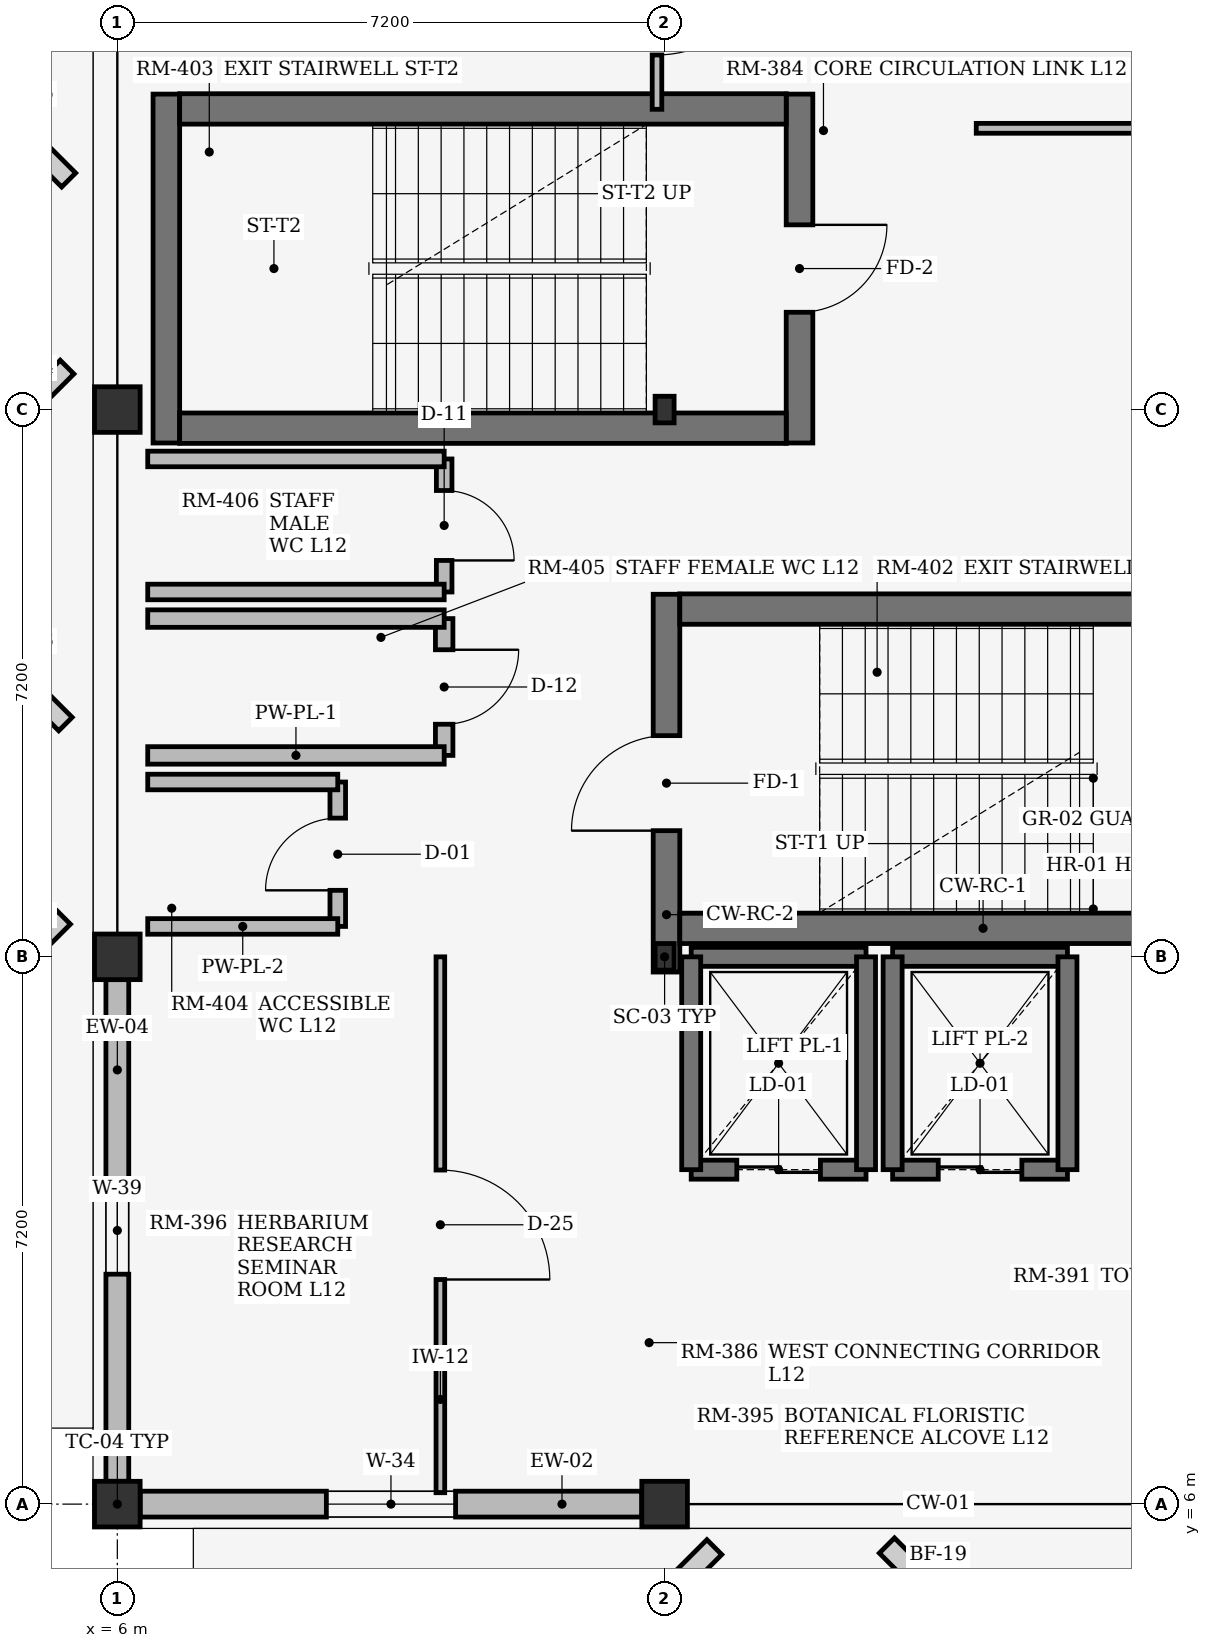
"""IFC4 building model, lengths in metres.
Left out: names, types, materials, properties, quantities, classifications, styles, units other than length and angle.
Written with IfcOpenShell. Run it as: python <this file> out.ifc"""

import sys

from ifc_helpers import new_model, si_unit, direction, frame, frame_2d, origin, origin_2d, place, context, subcontext, project, spatial, rectangle, i_section, extrude, element, fill, save


model = new_model("IFC4")
c1 = context("Model", 3, precision=1e-05, world=origin(), true_north=direction((0.0, 1.0)))
c2 = subcontext(c1, "Body", "Model", "MODEL_VIEW")
j1 = project(units=[si_unit("LENGTHUNIT", "METRE"), si_unit("PLANEANGLEUNIT", "RADIAN")], contexts=[c1])
p1 = place(None, origin())
s1 = spatial("IfcSite", under=j1, at=p1, CompositionType="ELEMENT")
p2 = place(p1, origin())
s2 = spatial("IfcBuilding", under=s1, at=p2, CompositionType="ELEMENT")
p3 = place(p2, frame((0.0, 0.0, 48.3)))
s3 = spatial("IfcBuildingStorey", under=s2, at=p3, CompositionType="ELEMENT", Elevation=48.3)
for number, where, z_axis, x_axis in (
    (1, (6.0, 6.0, 0.0), (0.0, 0.0, 1.0), (1.0, 0.0, 0.0)),
    (2, (6.0, 13.2, 0.0), (0.0, 0.0, 1.0), (1.0, 0.0, 0.0)),
    (3, (6.0, 20.4, 0.0), (0.0, 0.0, 1.0), (1.0, 0.0, 0.0)),
    (4, (13.2, 6.0, 0.0), (0.0, 0.0, 1.0), (1.0, 0.0, 0.0)),
):
    element("IfcColumn", number, at=place(p3, frame(where, z_axis=z_axis, x_axis=x_axis)), inside=s3, PredefinedType="COLUMN", context=c2, shape_type="SweptSolid", body=[
        extrude(rectangle(XDim=0.6, YDim=0.6, at=origin_2d()), origin(), (0.0, 0.0, 1.0), 3.68),
    ])
for number, where, z_axis, x_axis in (
    (5, (13.2, 13.2, 0.0), (0.0, 0.0, 1.0), (1.0, 0.0, 0.0)),
    (6, (13.2, 20.4, 0.0), (0.0, 0.0, 1.0), (1.0, 0.0, 0.0)),
):
    element("IfcColumn", number, at=place(p3, frame(where, z_axis=z_axis, x_axis=x_axis)), inside=s3, PredefinedType="COLUMN", context=c2, shape_type="SweptSolid", body=[
        extrude(i_section(OverallWidth=0.25, OverallDepth=0.35, WebThickness=0.01, FlangeThickness=0.012, at=origin_2d()), origin(), (0.0, 0.0, 1.0), 3.68),
    ])
p4 = place(p3, frame((6.3, 6.0, 0.0), z_axis=(0.0, 0.0, 1.0), x_axis=(1.0, 0.0, 0.0)))
e7 = element("IfcWall", 7, at=p4, inside=s3, PredefinedType="STANDARD", context=c2, shape_type="SweptSolid", body=[
    extrude(rectangle(XDim=6.6, YDim=0.34, at=frame_2d((3.3, 0.0))), origin(), (0.0, 0.0, 1.0), 3.26),
])
p5 = place(p4, frame((2.45, 0.0, 0.75)))
e8 = element("IfcOpeningElement", 8, at=p5, cuts=e7, PredefinedType="OPENING", context=c2, shape_type="SweptSolid", body=[
    extrude(rectangle(XDim=1.7, YDim=1.35, at=frame_2d((0.85, 0.675))), frame((0.0, 0.18, 0.0), z_axis=(0.0, -1.0, 0.0), x_axis=(1.0, 0.0, 0.0)), (0.0, 0.0, 1.0), 0.36),
])
p6 = place(p3, frame((6.0, 6.3, 0.0), z_axis=(0.0, 0.0, 1.0), x_axis=(0.0, 1.0, 0.0)))
e9 = element("IfcWall", 9, at=p6, inside=s3, PredefinedType="STANDARD", context=c2, shape_type="SweptSolid", body=[
    extrude(rectangle(XDim=6.6, YDim=0.3, at=frame_2d((3.3, 0.0))), origin(), (0.0, 0.0, 1.0), 3.26),
])
p7 = place(p6, frame((2.725, 0.0, 0.75)))
e10 = element("IfcOpeningElement", 10, at=p7, cuts=e9, PredefinedType="OPENING", context=c2, shape_type="SweptSolid", body=[
    extrude(rectangle(XDim=1.15, YDim=1.5, at=frame_2d((0.575, 0.75))), frame((0.0, 0.16, 0.0), z_axis=(0.0, -1.0, 0.0), x_axis=(1.0, 0.0, 0.0)), (0.0, 0.0, 1.0), 0.32),
])
p8 = place(p3, frame((13.225, 13.0, 0.0), z_axis=(0.0, 0.0, 1.0), x_axis=(0.0, 1.0, 0.0)))
e11 = element("IfcWall", 11, at=p8, inside=s3, PredefinedType="SHEAR", context=c2, shape_type="SweptSolid", body=[
    extrude(rectangle(XDim=4.97, YDim=0.35, at=frame_2d((2.485, 0.0))), origin(), (0.0, 0.0, 1.0), 3.68),
])
p9 = place(p8, frame((1.86, 0.0, 0.0)))
e12 = element("IfcOpeningElement", 12, at=p9, cuts=e11, PredefinedType="OPENING", context=c2, shape_type="SweptSolid", body=[
    extrude(rectangle(XDim=1.25, YDim=2.2, at=frame_2d((0.625, 1.1))), frame((0.0, 0.185, 0.0), z_axis=(0.0, -1.0, 0.0), x_axis=(1.0, 0.0, 0.0)), (0.0, 0.0, 1.0), 0.37),
])
for number, where, z_axis, x_axis in (
    (13, (13.4, 13.575, 0.0), (0.0, 0.0, 1.0), (1.0, 0.0, 0.0)),
    (14, (13.4, 17.775, 0.0), (0.0, 0.0, 1.0), (1.0, 0.0, 0.0)),
):
    element("IfcWall", number, at=place(p3, frame(where, z_axis=z_axis, x_axis=x_axis)), inside=s3, PredefinedType="SHEAR", context=c2, shape_type="SweptSolid", body=[
        extrude(rectangle(XDim=7.98, YDim=0.4, at=frame_2d((3.99, 0.0))), origin(), (0.0, 0.0, 1.0), 3.68),
    ])
p10 = place(p3, frame((14.975, 24.55, 0.0), z_axis=(0.0, 0.0, 1.0), x_axis=(0.0, -1.0, 0.0)))
e15 = element("IfcWall", 15, at=p10, inside=s3, PredefinedType="SHEAR", context=c2, shape_type="SweptSolid", body=[
    extrude(rectangle(XDim=4.59, YDim=0.35, at=frame_2d((2.295, 0.0))), origin(), (0.0, 0.0, 1.0), 3.68),
])
p11 = place(p10, frame((1.72, 0.0, 0.0)))
e16 = element("IfcOpeningElement", 16, at=p11, cuts=e15, PredefinedType="OPENING", context=c2, shape_type="SweptSolid", body=[
    extrude(rectangle(XDim=1.15, YDim=2.2, at=frame_2d((0.575, 1.1))), frame((0.0, 0.185, 0.0), z_axis=(0.0, -1.0, 0.0), x_axis=(1.0, 0.0, 0.0)), (0.0, 0.0, 1.0), 0.37),
])
p12 = place(p3, frame((6.645, 24.55, 0.0), z_axis=(0.0, 0.0, 1.0), x_axis=(0.0, -1.0, 0.0)))
e17 = element("IfcWall", 17, at=p12, inside=s3, PredefinedType="SHEAR", context=c2, shape_type="SweptSolid", body=[
    extrude(rectangle(XDim=4.59, YDim=0.35, at=frame_2d((2.295, 0.0))), origin(), (0.0, 0.0, 1.0), 3.68),
])
for number, where, z_axis, x_axis in (
    (18, (14.8, 24.355, 0.0), (0.0, 0.0, 1.0), (-1.0, 0.0, 0.0)),
    (19, (14.8, 20.155, 0.0), (0.0, 0.0, 1.0), (-1.0, 0.0, 0.0)),
):
    element("IfcWall", number, at=place(p3, frame(where, z_axis=z_axis, x_axis=x_axis)), inside=s3, PredefinedType="SHEAR", context=c2, shape_type="SweptSolid", body=[
        extrude(rectangle(XDim=7.98, YDim=0.4, at=frame_2d((3.99, 0.0))), origin(), (0.0, 0.0, 1.0), 3.68),
    ])
p13 = place(p3, frame((13.55, 10.4, 0.0), z_axis=(0.0, 0.0, 1.0), x_axis=(1.0, 0.0, 0.0)))
e20 = element("IfcWall", 20, at=p13, inside=s3, PredefinedType="SHEAR", context=c2, shape_type="SweptSolid", body=[
    extrude(rectangle(XDim=2.3, YDim=0.25, at=frame_2d((1.15, 0.0))), origin(), (0.0, 0.0, 1.0), 3.68),
])
p14 = place(p13, frame((0.6, 0.0, 0.0)))
e21 = element("IfcOpeningElement", 21, at=p14, cuts=e20, PredefinedType="OPENING", context=c2, shape_type="SweptSolid", body=[
    extrude(rectangle(XDim=1.1, YDim=2.2, at=frame_2d((0.55, 1.1))), frame((0.0, 0.135, 0.0), z_axis=(0.0, -1.0, 0.0), x_axis=(1.0, 0.0, 0.0)), (0.0, 0.0, 1.0), 0.27),
])
p15 = place(p3, frame((13.55, 13.2, 0.0), z_axis=(0.0, 0.0, 1.0), x_axis=(1.0, 0.0, 0.0)))
e22 = element("IfcWall", 22, at=p15, inside=s3, PredefinedType="SHEAR", context=c2, shape_type="SweptSolid", body=[
    extrude(rectangle(XDim=2.3, YDim=0.25, at=frame_2d((1.15, 0.0))), origin(), (0.0, 0.0, 1.0), 3.68),
])
for number, where, z_axis, x_axis in (
    (23, (13.55, 10.4, 0.0), (0.0, 0.0, 1.0), (0.0, 1.0, 0.0)),
    (24, (15.85, 10.4, 0.0), (0.0, 0.0, 1.0), (0.0, 1.0, 0.0)),
):
    element("IfcWall", number, at=place(p3, frame(where, z_axis=z_axis, x_axis=x_axis)), inside=s3, PredefinedType="SHEAR", context=c2, shape_type="SweptSolid", body=[
        extrude(rectangle(XDim=2.8, YDim=0.25, at=frame_2d((1.4, 0.0))), origin(), (0.0, 0.0, 1.0), 3.68),
    ])
p16 = place(p3, frame((16.2, 10.4, 0.0), z_axis=(0.0, 0.0, 1.0), x_axis=(1.0, 0.0, 0.0)))
e25 = element("IfcWall", 25, at=p16, inside=s3, PredefinedType="SHEAR", context=c2, shape_type="SweptSolid", body=[
    extrude(rectangle(XDim=2.3, YDim=0.25, at=frame_2d((1.15, 0.0))), origin(), (0.0, 0.0, 1.0), 3.68),
])
p17 = place(p16, frame((0.6, 0.0, 0.0)))
e26 = element("IfcOpeningElement", 26, at=p17, cuts=e25, PredefinedType="OPENING", context=c2, shape_type="SweptSolid", body=[
    extrude(rectangle(XDim=1.1, YDim=2.2, at=frame_2d((0.55, 1.1))), frame((0.0, 0.135, 0.0), z_axis=(0.0, -1.0, 0.0), x_axis=(1.0, 0.0, 0.0)), (0.0, 0.0, 1.0), 0.27),
])
p18 = place(p3, frame((16.2, 13.2, 0.0), z_axis=(0.0, 0.0, 1.0), x_axis=(1.0, 0.0, 0.0)))
e27 = element("IfcWall", 27, at=p18, inside=s3, PredefinedType="SHEAR", context=c2, shape_type="SweptSolid", body=[
    extrude(rectangle(XDim=2.3, YDim=0.25, at=frame_2d((1.15, 0.0))), origin(), (0.0, 0.0, 1.0), 3.68),
])
for number, where, z_axis, x_axis in (
    (28, (16.2, 10.4, 0.0), (0.0, 0.0, 1.0), (0.0, 1.0, 0.0)),
    (29, (18.5, 10.4, 0.0), (0.0, 0.0, 1.0), (0.0, 1.0, 0.0)),
):
    element("IfcWall", number, at=place(p3, frame(where, z_axis=z_axis, x_axis=x_axis)), inside=s3, PredefinedType="SHEAR", context=c2, shape_type="SweptSolid", body=[
        extrude(rectangle(XDim=2.8, YDim=0.25, at=frame_2d((1.4, 0.0))), origin(), (0.0, 0.0, 1.0), 3.68),
    ])
p19 = place(p3, frame((8.9, 13.6, 0.0), z_axis=(0.0, 0.0, 1.0), x_axis=(0.0, 1.0, 0.0)))
e30 = element("IfcWall", 30, at=p19, inside=s3, PredefinedType="PLUMBINGWALL", context=c2, shape_type="SweptSolid", body=[
    extrude(rectangle(XDim=1.9, YDim=0.205, at=frame_2d((0.95, 0.0))), origin(), (0.0, 0.0, 1.0), 3.66),
])
p20 = place(p19, frame((0.475, 0.0, 0.0)))
e31 = element("IfcOpeningElement", 31, at=p20, cuts=e30, PredefinedType="OPENING", context=c2, shape_type="SweptSolid", body=[
    extrude(rectangle(XDim=0.95, YDim=2.15, at=frame_2d((0.475, 1.075))), frame((0.0, 0.113, 0.0), z_axis=(0.0, -1.0, 0.0), x_axis=(1.0, 0.0, 0.0)), (0.0, 0.0, 1.0), 0.225),
])
for number, where, z_axis, x_axis in (
    (32, (6.4, 13.6, 0.0), (0.0, 0.0, 1.0), (1.0, 0.0, 0.0)),
    (33, (6.4, 15.5, 0.0), (0.0, 0.0, 1.0), (1.0, 0.0, 0.0)),
):
    element("IfcWall", number, at=place(p3, frame(where, z_axis=z_axis, x_axis=x_axis)), inside=s3, PredefinedType="PLUMBINGWALL", context=c2, shape_type="SweptSolid", body=[
        extrude(rectangle(XDim=2.5, YDim=0.205, at=frame_2d((1.25, 0.0))), origin(), (0.0, 0.0, 1.0), 3.66),
    ])
p21 = place(p3, frame((10.3, 15.85, 0.0), z_axis=(0.0, 0.0, 1.0), x_axis=(0.0, 1.0, 0.0)))
e34 = element("IfcWall", 34, at=p21, inside=s3, PredefinedType="PLUMBINGWALL", context=c2, shape_type="SweptSolid", body=[
    extrude(rectangle(XDim=1.8, YDim=0.23, at=frame_2d((0.9, 0.0))), origin(), (0.0, 0.0, 1.0), 3.66),
])
p22 = place(p21, frame((0.41, 0.0, 0.0)))
e35 = element("IfcOpeningElement", 35, at=p22, cuts=e34, PredefinedType="OPENING", context=c2, shape_type="SweptSolid", body=[
    extrude(rectangle(XDim=0.98, YDim=2.1, at=frame_2d((0.49, 1.05))), frame((0.0, 0.125, 0.0), z_axis=(0.0, -1.0, 0.0), x_axis=(1.0, 0.0, 0.0)), (0.0, 0.0, 1.0), 0.25),
])
for number, where, z_axis, x_axis in (
    (36, (6.4, 15.85, 0.0), (0.0, 0.0, 1.0), (1.0, 0.0, 0.0)),
    (37, (6.4, 17.65, 0.0), (0.0, 0.0, 1.0), (1.0, 0.0, 0.0)),
):
    element("IfcWall", number, at=place(p3, frame(where, z_axis=z_axis, x_axis=x_axis)), inside=s3, PredefinedType="PLUMBINGWALL", context=c2, shape_type="SweptSolid", body=[
        extrude(rectangle(XDim=3.9, YDim=0.23, at=frame_2d((1.95, 0.0))), origin(), (0.0, 0.0, 1.0), 3.66),
    ])
p23 = place(p3, frame((10.3, 18.0, 0.0), z_axis=(0.0, 0.0, 1.0), x_axis=(0.0, 1.0, 0.0)))
e38 = element("IfcWall", 38, at=p23, inside=s3, PredefinedType="PLUMBINGWALL", context=c2, shape_type="SweptSolid", body=[
    extrude(rectangle(XDim=1.75, YDim=0.205, at=frame_2d((0.875, 0.0))), origin(), (0.0, 0.0, 1.0), 3.66),
])
p24 = place(p23, frame((0.415, 0.0, 0.0)))
e39 = element("IfcOpeningElement", 39, at=p24, cuts=e38, PredefinedType="OPENING", context=c2, shape_type="SweptSolid", body=[
    extrude(rectangle(XDim=0.92, YDim=2.1, at=frame_2d((0.46, 1.05))), frame((0.0, 0.113, 0.0), z_axis=(0.0, -1.0, 0.0), x_axis=(1.0, 0.0, 0.0)), (0.0, 0.0, 1.0), 0.225),
])
for number, where, z_axis, x_axis in (
    (40, (6.4, 18.0, 0.0), (0.0, 0.0, 1.0), (1.0, 0.0, 0.0)),
    (41, (6.4, 19.75, 0.0), (0.0, 0.0, 1.0), (1.0, 0.0, 0.0)),
):
    element("IfcWall", number, at=place(p3, frame(where, z_axis=z_axis, x_axis=x_axis)), inside=s3, PredefinedType="PLUMBINGWALL", context=c2, shape_type="SweptSolid", body=[
        extrude(rectangle(XDim=3.9, YDim=0.205, at=frame_2d((1.95, 0.0))), origin(), (0.0, 0.0, 1.0), 3.66),
    ])
p25 = place(p3, frame((17.3, 24.1, 0.0), z_axis=(0.0, 0.0, 1.0), x_axis=(1.0, 0.0, 0.0)))
e42 = element("IfcWall", 42, at=p25, inside=s3, PredefinedType="PARTITIONING", context=c2, shape_type="SweptSolid", body=[
    extrude(rectangle(XDim=7.05, YDim=0.13, at=frame_2d((3.525, 0.0))), origin(), (0.0, 0.0, 1.0), 3.66),
])
p26 = place(p25, frame((3.055, 0.0, 0.0)))
e43 = element("IfcOpeningElement", 43, at=p26, cuts=e42, PredefinedType="OPENING", context=c2, shape_type="SweptSolid", body=[
    extrude(rectangle(XDim=0.94, YDim=2.18, at=frame_2d((0.47, 1.09))), frame((0.0, 0.075, 0.0), z_axis=(0.0, -1.0, 0.0), x_axis=(1.0, 0.0, 0.0)), (0.0, 0.0, 1.0), 0.15),
])
p27 = place(p3, frame((10.25, 6.15, 0.0), z_axis=(0.0, 0.0, 1.0), x_axis=(0.0, 1.0, 0.0)))
e44 = element("IfcWall", 44, at=p27, inside=s3, PredefinedType="PARTITIONING", context=c2, shape_type="SweptSolid", body=[
    extrude(rectangle(XDim=7.05, YDim=0.114, at=frame_2d((3.525, 0.0))), origin(), (0.0, 0.0, 1.0), 3.66),
])
p28 = place(p27, frame((2.805, 0.0, 0.0)))
e45 = element("IfcOpeningElement", 45, at=p28, cuts=e44, PredefinedType="OPENING", context=c2, shape_type="SweptSolid", body=[
    extrude(rectangle(XDim=1.44, YDim=2.24, at=frame_2d((0.72, 1.12))), frame((0.0, 0.067, 0.0), z_axis=(0.0, -1.0, 0.0), x_axis=(1.0, 0.0, 0.0)), (0.0, 0.0, 1.0), 0.134),
])
p29 = place(p3, frame((13.1, 24.35, 0.0), z_axis=(0.0, 0.0, 1.0), x_axis=(0.0, 1.0, 0.0)))
e46 = element("IfcWall", 46, at=p29, inside=s3, PredefinedType="PARTITIONING", context=c2, shape_type="SweptSolid", body=[
    extrude(rectangle(XDim=2.95, YDim=0.126, at=frame_2d((1.475, 0.0))), origin(), (0.0, 0.0, 1.0), 3.27),
])
p30 = place(p29, frame((0.715, 0.0, 0.0)))
e47 = element("IfcOpeningElement", 47, at=p30, cuts=e46, PredefinedType="OPENING", context=c2, shape_type="SweptSolid", body=[
    extrude(rectangle(XDim=1.52, YDim=2.26, at=frame_2d((0.76, 1.13))), frame((0.0, 0.073, 0.0), z_axis=(0.0, -1.0, 0.0), x_axis=(1.0, 0.0, 0.0)), (0.0, 0.0, 1.0), 0.146),
])
p31 = place(p5, origin())
e48 = element("IfcWindow", 48, at=p31, inside=s3, PartitioningType="SINGLE_PANEL", PredefinedType="WINDOW", context=c2, shape_type="SweptSolid", body=[
    extrude(rectangle(XDim=1.7, YDim=1.35, at=frame_2d((0.85, 0.675))), frame((0.0, 0.03, 0.0), z_axis=(0.0, -1.0, 0.0), x_axis=(1.0, 0.0, 0.0)), (0.0, 0.0, 1.0), 0.06),
])
fill(e8, e48)
p32 = place(p7, origin())
e49 = element("IfcWindow", 49, at=p32, inside=s3, PartitioningType="SINGLE_PANEL", PredefinedType="WINDOW", context=c2, shape_type="SweptSolid", body=[
    extrude(rectangle(XDim=1.15, YDim=1.5, at=frame_2d((0.575, 0.75))), frame((0.0, 0.03, 0.0), z_axis=(0.0, -1.0, 0.0), x_axis=(1.0, 0.0, 0.0)), (0.0, 0.0, 1.0), 0.06),
])
fill(e10, e49)
p33 = place(p9, origin())
e50 = element("IfcDoor", 50, at=p33, inside=s3, OperationType="SINGLE_SWING_LEFT", PredefinedType="DOOR", context=c2, shape_type="SweptSolid", body=[
    extrude(rectangle(XDim=1.25, YDim=2.2, at=frame_2d((0.625, 1.1))), frame((0.0, 0.025, 0.0), z_axis=(0.0, -1.0, 0.0), x_axis=(1.0, 0.0, 0.0)), (0.0, 0.0, 1.0), 0.05),
])
fill(e12, e50)
p34 = place(p11, origin())
e51 = element("IfcDoor", 51, at=p34, inside=s3, OperationType="SINGLE_SWING_LEFT", PredefinedType="DOOR", context=c2, shape_type="SweptSolid", body=[
    extrude(rectangle(XDim=1.15, YDim=2.2, at=frame_2d((0.575, 1.1))), frame((0.0, 0.025, 0.0), z_axis=(0.0, -1.0, 0.0), x_axis=(1.0, 0.0, 0.0)), (0.0, 0.0, 1.0), 0.05),
])
fill(e16, e51)
p35 = place(p14, origin())
e52 = element("IfcDoor", 52, at=p35, inside=s3, OperationType="DOUBLE_DOOR_SLIDING", PredefinedType="DOOR", context=c2, shape_type="SweptSolid", body=[
    extrude(rectangle(XDim=1.1, YDim=2.2, at=frame_2d((0.55, 1.1))), frame((0.0, 0.025, 0.0), z_axis=(0.0, -1.0, 0.0), x_axis=(1.0, 0.0, 0.0)), (0.0, 0.0, 1.0), 0.05),
])
fill(e21, e52)
p36 = place(p17, origin())
e53 = element("IfcDoor", 53, at=p36, inside=s3, OperationType="DOUBLE_DOOR_SLIDING", PredefinedType="DOOR", context=c2, shape_type="SweptSolid", body=[
    extrude(rectangle(XDim=1.1, YDim=2.2, at=frame_2d((0.55, 1.1))), frame((0.0, 0.025, 0.0), z_axis=(0.0, -1.0, 0.0), x_axis=(1.0, 0.0, 0.0)), (0.0, 0.0, 1.0), 0.05),
])
fill(e26, e53)
p37 = place(p20, origin())
e54 = element("IfcDoor", 54, at=p37, inside=s3, OperationType="SINGLE_SWING_LEFT", PredefinedType="DOOR", context=c2, shape_type="SweptSolid", body=[
    extrude(rectangle(XDim=0.95, YDim=2.15, at=frame_2d((0.475, 1.075))), frame((0.0, 0.025, 0.0), z_axis=(0.0, -1.0, 0.0), x_axis=(1.0, 0.0, 0.0)), (0.0, 0.0, 1.0), 0.05),
])
fill(e31, e54)
p38 = place(p22, origin())
e55 = element("IfcDoor", 55, at=p38, inside=s3, OperationType="SINGLE_SWING_RIGHT", PredefinedType="DOOR", context=c2, shape_type="SweptSolid", body=[
    extrude(rectangle(XDim=0.98, YDim=2.1, at=frame_2d((0.49, 1.05))), frame((0.0, 0.025, 0.0), z_axis=(0.0, -1.0, 0.0), x_axis=(1.0, 0.0, 0.0)), (0.0, 0.0, 1.0), 0.05),
])
fill(e35, e55)
p39 = place(p24, frame((0.92, 0.0, 0.0), z_axis=(0.0, 0.0, 1.0), x_axis=(-1.0, 0.0, 0.0)))
e56 = element("IfcDoor", 56, at=p39, inside=s3, OperationType="SINGLE_SWING_LEFT", PredefinedType="DOOR", context=c2, shape_type="SweptSolid", body=[
    extrude(rectangle(XDim=0.92, YDim=2.1, at=frame_2d((0.46, 1.05))), frame((0.0, 0.025, 0.0), z_axis=(0.0, -1.0, 0.0), x_axis=(1.0, 0.0, 0.0)), (0.0, 0.0, 1.0), 0.05),
])
fill(e39, e56)
p40 = place(p28, frame((1.44, 0.0, 0.0), z_axis=(0.0, 0.0, 1.0), x_axis=(-1.0, 0.0, 0.0)))
e57 = element("IfcDoor", 57, at=p40, inside=s3, OperationType="SINGLE_SWING_LEFT", PredefinedType="DOOR", context=c2, shape_type="SweptSolid", body=[
    extrude(rectangle(XDim=1.44, YDim=2.24, at=frame_2d((0.72, 1.12))), frame((0.0, 0.025, 0.0), z_axis=(0.0, -1.0, 0.0), x_axis=(1.0, 0.0, 0.0)), (0.0, 0.0, 1.0), 0.05),
])
fill(e45, e57)
p41 = place(p30, origin())
e58 = element("IfcDoor", 58, at=p41, inside=s3, OperationType="SINGLE_SWING_RIGHT", PredefinedType="DOOR", context=c2, shape_type="SweptSolid", body=[
    extrude(rectangle(XDim=1.52, YDim=2.26, at=frame_2d((0.76, 1.13))), frame((0.0, 0.025, 0.0), z_axis=(0.0, -1.0, 0.0), x_axis=(1.0, 0.0, 0.0)), (0.0, 0.0, 1.0), 0.05),
])
fill(e47, e58)
save(model, sys.argv[1])
